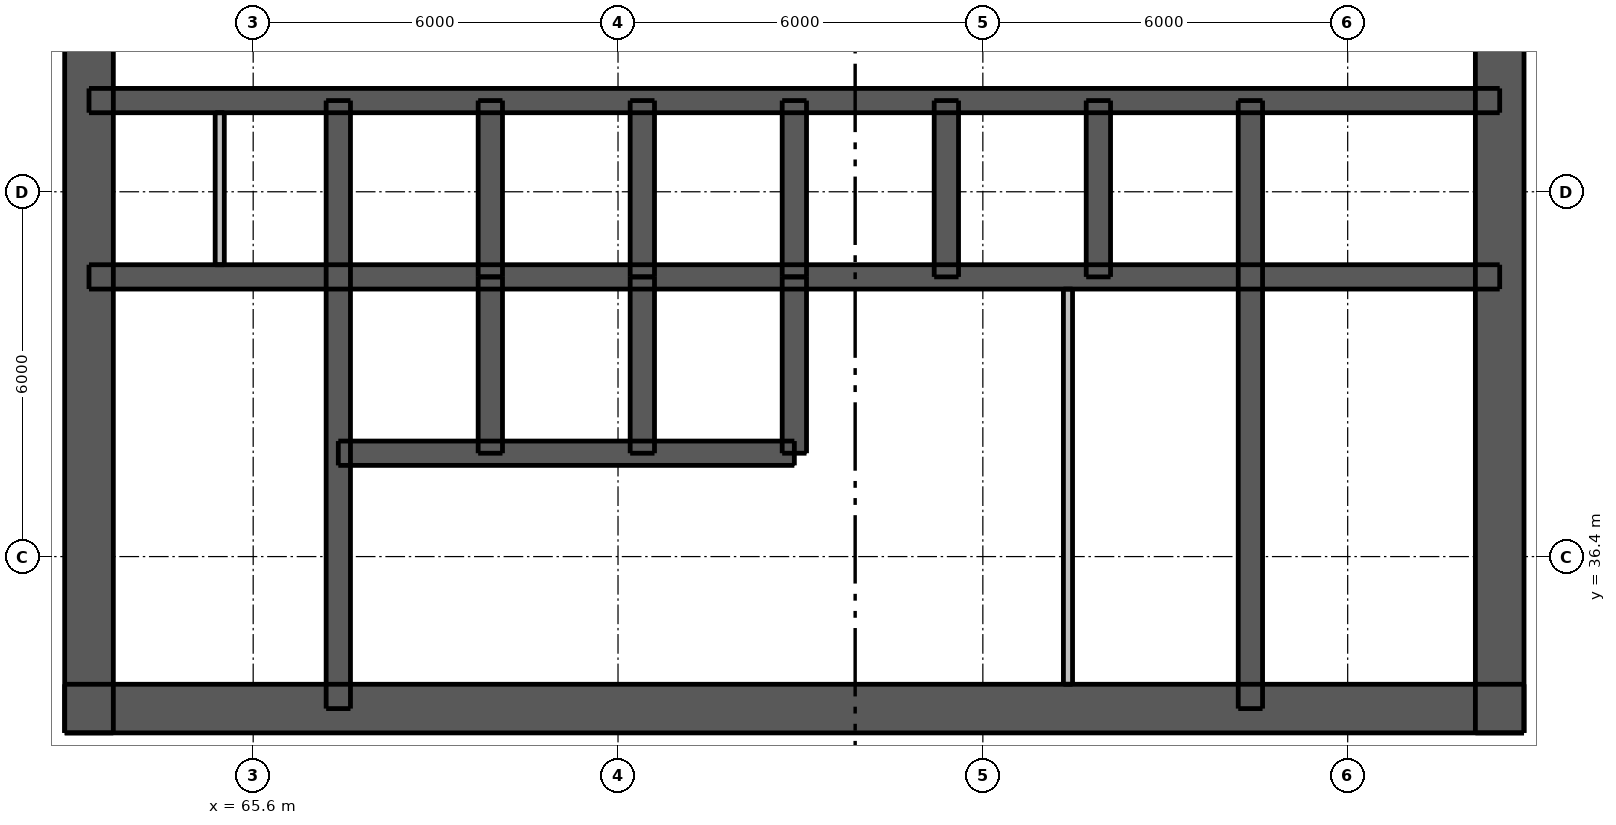
"""IFC4 building model, lengths in metres.
Left out: names, types, materials, properties, quantities, classifications, styles, units other than length and angle.
Written with IfcOpenShell. Run it as: python <this file> out.ifc"""

import sys

from ifc_helpers import new_model, si_unit, direction, frame, frame_2d, origin, place, context, subcontext, project, spatial, rectangle, extrude, element, fill, save


model = new_model("IFC4")
c1 = context("Model", 3, precision=1e-05, world=origin(), true_north=direction((0.0, 1.0)))
c2 = subcontext(c1, "Body", "Model", "MODEL_VIEW")
j1 = project(units=[si_unit("LENGTHUNIT", "METRE"), si_unit("PLANEANGLEUNIT", "RADIAN")], contexts=[c1])
p1 = place(None, origin())
s1 = spatial("IfcSite", under=j1, at=p1, CompositionType="ELEMENT")
p2 = place(p1, origin())
s2 = spatial("IfcBuilding", under=s1, at=p2, CompositionType="ELEMENT")
p3 = place(p2, frame((0.0, 0.0, 85.3)))
s3 = spatial("IfcBuildingStorey", under=s2, at=p3, CompositionType="ELEMENT", Elevation=85.3)
p4 = place(p3, frame((62.5, 33.9, 0.0), z_axis=(0.0, 0.0, 1.0), x_axis=(1.0, 0.0, 0.0)))
e1 = element("IfcWall", 1, at=p4, inside=s3, PredefinedType="SHEAR", context=c2, shape_type="SweptSolid", body=[
    extrude(rectangle(XDim=24.0, YDim=0.8, at=frame_2d((12.0, 0.0))), origin(), (0.0, 0.0, 1.0), 3.05),
])
p5 = place(p4, frame((2.0, 0.0, 0.0)))
e2 = element("IfcOpeningElement", 2, at=p5, cuts=e1, PredefinedType="OPENING", context=c2, shape_type="SweptSolid", body=[
    extrude(rectangle(XDim=1.1, YDim=2.1, at=frame_2d((0.55, 1.05))), frame((0.0, 0.41, 0.0), z_axis=(0.0, -1.0, 0.0), x_axis=(1.0, 0.0, 0.0)), (0.0, 0.0, 1.0), 0.82),
])
p6 = place(p4, frame((20.9, 0.0, 0.0)))
e3 = element("IfcOpeningElement", 3, at=p6, cuts=e1, PredefinedType="OPENING", context=c2, shape_type="SweptSolid", body=[
    extrude(rectangle(XDim=1.1, YDim=2.1, at=frame_2d((0.55, 1.05))), frame((0.0, 0.41, 0.0), z_axis=(0.0, -1.0, 0.0), x_axis=(1.0, 0.0, 0.0)), (0.0, 0.0, 1.0), 0.82),
])
p7 = place(p4, frame((8.0, 0.0, 0.0)))
e4 = element("IfcOpeningElement", 4, at=p7, cuts=e1, PredefinedType="OPENING", context=c2, shape_type="SweptSolid", body=[
    extrude(rectangle(XDim=1.1, YDim=2.1, at=frame_2d((0.55, 1.05))), frame((0.0, 0.41, 0.0), z_axis=(0.0, -1.0, 0.0), x_axis=(1.0, 0.0, 0.0)), (0.0, 0.0, 1.0), 0.82),
])
p8 = place(p4, frame((17.488, 0.0, 0.0)))
e5 = element("IfcOpeningElement", 5, at=p8, cuts=e1, PredefinedType="OPENING", context=c2, shape_type="SweptSolid", body=[
    extrude(rectangle(XDim=0.9, YDim=2.1, at=frame_2d((0.45, 1.05))), frame((0.0, 0.41, 0.0), z_axis=(0.0, -1.0, 0.0), x_axis=(1.0, 0.0, 0.0)), (0.0, 0.0, 1.0), 0.82),
])
p9 = place(p3, frame((62.9, 33.5, 0.0), z_axis=(0.0, 0.0, 1.0), x_axis=(0.0, 1.0, 0.0)))
e6 = element("IfcWall", 6, at=p9, inside=s3, PredefinedType="SHEAR", context=c2, shape_type="SweptSolid", body=[
    extrude(rectangle(XDim=24.0, YDim=0.8, at=frame_2d((12.0, 0.0))), origin(), (0.0, 0.0, 1.0), 3.05),
])
p10 = place(p9, frame((11.2, 0.0, 0.0)))
e7 = element("IfcOpeningElement", 7, at=p10, cuts=e6, PredefinedType="OPENING", context=c2, shape_type="SweptSolid", body=[
    extrude(rectangle(XDim=1.6, YDim=2.1, at=frame_2d((0.8, 1.05))), frame((0.0, 0.41, 0.0), z_axis=(0.0, -1.0, 0.0), x_axis=(1.0, 0.0, 0.0)), (0.0, 0.0, 1.0), 0.82),
])
p11 = place(p3, frame((86.1, 33.5, 0.0), z_axis=(0.0, 0.0, 1.0), x_axis=(0.0, 1.0, 0.0)))
e8 = element("IfcWall", 8, at=p11, inside=s3, PredefinedType="SHEAR", context=c2, shape_type="SweptSolid", body=[
    extrude(rectangle(XDim=24.0, YDim=0.8, at=frame_2d((12.0, 0.0))), origin(), (0.0, 0.0, 1.0), 3.05),
])
p12 = place(p11, frame((11.2, 0.0, 0.0)))
e9 = element("IfcOpeningElement", 9, at=p12, cuts=e8, PredefinedType="OPENING", context=c2, shape_type="SweptSolid", body=[
    extrude(rectangle(XDim=1.6, YDim=2.1, at=frame_2d((0.8, 1.05))), frame((0.0, 0.41, 0.0), z_axis=(0.0, -1.0, 0.0), x_axis=(1.0, 0.0, 0.0)), (0.0, 0.0, 1.0), 0.82),
])
p13 = place(p3, frame((62.9, 41.0, 0.0), z_axis=(0.0, 0.0, 1.0), x_axis=(1.0, 0.0, 0.0)))
e10 = element("IfcWall", 10, at=p13, inside=s3, PredefinedType="SHEAR", context=c2, shape_type="SweptSolid", body=[
    extrude(rectangle(XDim=23.2, YDim=0.4, at=frame_2d((11.6, 0.0))), origin(), (0.0, 0.0, 1.0), 3.05),
])
p14 = place(p3, frame((62.9, 43.9, 0.0), z_axis=(0.0, 0.0, 1.0), x_axis=(1.0, 0.0, 0.0)))
e11 = element("IfcWall", 11, at=p14, inside=s3, PredefinedType="SHEAR", context=c2, shape_type="SweptSolid", body=[
    extrude(rectangle(XDim=23.2, YDim=0.4, at=frame_2d((11.6, 0.0))), origin(), (0.0, 0.0, 1.0), 3.05),
])
p15 = place(p14, frame((0.825, 0.0, 0.0)))
e12 = element("IfcOpeningElement", 12, at=p15, cuts=e11, PredefinedType="OPENING", context=c2, shape_type="SweptSolid", body=[
    extrude(rectangle(XDim=0.9, YDim=2.1, at=frame_2d((0.45, 1.05))), frame((0.0, 0.21, 0.0), z_axis=(0.0, -1.0, 0.0), x_axis=(1.0, 0.0, 0.0)), (0.0, 0.0, 1.0), 0.42),
])
p16 = place(p14, frame((2.575, 0.0, 0.0)))
e13 = element("IfcOpeningElement", 13, at=p16, cuts=e11, PredefinedType="OPENING", context=c2, shape_type="SweptSolid", body=[
    extrude(rectangle(XDim=0.9, YDim=2.1, at=frame_2d((0.45, 1.05))), frame((0.0, 0.21, 0.0), z_axis=(0.0, -1.0, 0.0), x_axis=(1.0, 0.0, 0.0)), (0.0, 0.0, 1.0), 0.42),
])
p17 = place(p14, frame((20.6, 0.0, 0.0)))
e14 = element("IfcOpeningElement", 14, at=p17, cuts=e11, PredefinedType="OPENING", context=c2, shape_type="SweptSolid", body=[
    extrude(rectangle(XDim=0.9, YDim=2.1, at=frame_2d((0.45, 1.05))), frame((0.0, 0.21, 0.0), z_axis=(0.0, -1.0, 0.0), x_axis=(1.0, 0.0, 0.0)), (0.0, 0.0, 1.0), 0.42),
])
p18 = place(p14, frame((4.8, 0.0, 0.0)))
e15 = element("IfcOpeningElement", 15, at=p18, cuts=e11, PredefinedType="OPENING", context=c2, shape_type="SweptSolid", body=[
    extrude(rectangle(XDim=1.1, YDim=2.1, at=frame_2d((0.55, 1.05))), frame((0.0, 0.21, 0.0), z_axis=(0.0, -1.0, 0.0), x_axis=(1.0, 0.0, 0.0)), (0.0, 0.0, 1.0), 0.42),
])
p19 = place(p14, frame((7.3, 0.0, 0.0)))
e16 = element("IfcOpeningElement", 16, at=p19, cuts=e11, PredefinedType="OPENING", context=c2, shape_type="SweptSolid", body=[
    extrude(rectangle(XDim=1.1, YDim=2.1, at=frame_2d((0.55, 1.05))), frame((0.0, 0.21, 0.0), z_axis=(0.0, -1.0, 0.0), x_axis=(1.0, 0.0, 0.0)), (0.0, 0.0, 1.0), 0.42),
])
p20 = place(p14, frame((9.8, 0.0, 0.0)))
e17 = element("IfcOpeningElement", 17, at=p20, cuts=e11, PredefinedType="OPENING", context=c2, shape_type="SweptSolid", body=[
    extrude(rectangle(XDim=1.1, YDim=2.1, at=frame_2d((0.55, 1.05))), frame((0.0, 0.21, 0.0), z_axis=(0.0, -1.0, 0.0), x_axis=(1.0, 0.0, 0.0)), (0.0, 0.0, 1.0), 0.42),
])
p21 = place(p14, frame((12.3, 0.0, 0.0)))
e18 = element("IfcOpeningElement", 18, at=p21, cuts=e11, PredefinedType="OPENING", context=c2, shape_type="SweptSolid", body=[
    extrude(rectangle(XDim=1.1, YDim=2.1, at=frame_2d((0.55, 1.05))), frame((0.0, 0.21, 0.0), z_axis=(0.0, -1.0, 0.0), x_axis=(1.0, 0.0, 0.0)), (0.0, 0.0, 1.0), 0.42),
])
p22 = place(p14, frame((14.8, 0.0, 0.0)))
e19 = element("IfcOpeningElement", 19, at=p22, cuts=e11, PredefinedType="OPENING", context=c2, shape_type="SweptSolid", body=[
    extrude(rectangle(XDim=1.1, YDim=2.1, at=frame_2d((0.55, 1.05))), frame((0.0, 0.21, 0.0), z_axis=(0.0, -1.0, 0.0), x_axis=(1.0, 0.0, 0.0)), (0.0, 0.0, 1.0), 0.42),
])
p23 = place(p14, frame((17.3, 0.0, 0.0)))
e20 = element("IfcOpeningElement", 20, at=p23, cuts=e11, PredefinedType="OPENING", context=c2, shape_type="SweptSolid", body=[
    extrude(rectangle(XDim=1.1, YDim=2.1, at=frame_2d((0.55, 1.05))), frame((0.0, 0.21, 0.0), z_axis=(0.0, -1.0, 0.0), x_axis=(1.0, 0.0, 0.0)), (0.0, 0.0, 1.0), 0.42),
])
p24 = place(p3, frame((67.0, 33.9, 0.0), z_axis=(0.0, 0.0, 1.0), x_axis=(0.0, 1.0, 0.0)))
e21 = element("IfcWall", 21, at=p24, inside=s3, PredefinedType="SHEAR", context=c2, shape_type="SweptSolid", body=[
    extrude(rectangle(XDim=10.0, YDim=0.4, at=frame_2d((5.0, 0.0))), origin(), (0.0, 0.0, 1.0), 3.05),
])
p25 = place(p24, frame((0.6, 0.0, 0.0)))
e22 = element("IfcOpeningElement", 22, at=p25, cuts=e21, PredefinedType="OPENING", context=c2, shape_type="SweptSolid", body=[
    extrude(rectangle(XDim=1.1, YDim=2.1, at=frame_2d((0.55, 1.05))), frame((0.0, 0.21, 0.0), z_axis=(0.0, -1.0, 0.0), x_axis=(1.0, 0.0, 0.0)), (0.0, 0.0, 1.0), 0.42),
])
p26 = place(p3, frame((82.0, 33.9, 0.0), z_axis=(0.0, 0.0, 1.0), x_axis=(0.0, 1.0, 0.0)))
e23 = element("IfcWall", 23, at=p26, inside=s3, PredefinedType="SHEAR", context=c2, shape_type="SweptSolid", body=[
    extrude(rectangle(XDim=10.0, YDim=0.4, at=frame_2d((5.0, 0.0))), origin(), (0.0, 0.0, 1.0), 3.05),
])
for number, where, z_axis, x_axis in (
    (24, (69.5, 41.0, 0.0), (0.0, 0.0, 1.0), (0.0, 1.0, 0.0)),
    (25, (72.0, 41.0, 0.0), (0.0, 0.0, 1.0), (0.0, 1.0, 0.0)),
    (26, (74.5, 41.0, 0.0), (0.0, 0.0, 1.0), (0.0, 1.0, 0.0)),
    (27, (77.0, 41.0, 0.0), (0.0, 0.0, 1.0), (0.0, 1.0, 0.0)),
    (28, (79.5, 41.0, 0.0), (0.0, 0.0, 1.0), (0.0, 1.0, 0.0)),
):
    element("IfcWall", number, at=place(p3, frame(where, z_axis=z_axis, x_axis=x_axis)), inside=s3, PredefinedType="SHEAR", context=c2, shape_type="SweptSolid", body=[
        extrude(rectangle(XDim=2.9, YDim=0.4, at=frame_2d((1.45, 0.0))), origin(), (0.0, 0.0, 1.0), 3.05),
    ])
p27 = place(p3, frame((67.0, 38.1, 0.0), z_axis=(0.0, 0.0, 1.0), x_axis=(1.0, 0.0, 0.0)))
e29 = element("IfcWall", 29, at=p27, inside=s3, PredefinedType="SHEAR", context=c2, shape_type="SweptSolid", body=[
    extrude(rectangle(XDim=7.5, YDim=0.4, at=frame_2d((3.75, 0.0))), origin(), (0.0, 0.0, 1.0), 3.05),
])
p28 = place(p27, frame((0.7, 0.0, 0.0)))
e30 = element("IfcOpeningElement", 30, at=p28, cuts=e29, PredefinedType="OPENING", context=c2, shape_type="SweptSolid", body=[
    extrude(rectangle(XDim=1.1, YDim=2.1, at=frame_2d((0.55, 1.05))), frame((0.0, 0.21, 0.0), z_axis=(0.0, -1.0, 0.0), x_axis=(1.0, 0.0, 0.0)), (0.0, 0.0, 1.0), 0.42),
])
p29 = place(p27, frame((3.2, 0.0, 0.0)))
e31 = element("IfcOpeningElement", 31, at=p29, cuts=e29, PredefinedType="OPENING", context=c2, shape_type="SweptSolid", body=[
    extrude(rectangle(XDim=1.1, YDim=2.1, at=frame_2d((0.55, 1.05))), frame((0.0, 0.21, 0.0), z_axis=(0.0, -1.0, 0.0), x_axis=(1.0, 0.0, 0.0)), (0.0, 0.0, 1.0), 0.42),
])
p30 = place(p27, frame((5.65, 0.0, 0.0)))
e32 = element("IfcOpeningElement", 32, at=p30, cuts=e29, PredefinedType="OPENING", context=c2, shape_type="SweptSolid", body=[
    extrude(rectangle(XDim=1.2, YDim=2.1, at=frame_2d((0.6, 1.05))), frame((0.0, 0.21, 0.0), z_axis=(0.0, -1.0, 0.0), x_axis=(1.0, 0.0, 0.0)), (0.0, 0.0, 1.0), 0.42),
])
for number, where, z_axis, x_axis in (
    (33, (69.5, 38.1, 0.0), (0.0, 0.0, 1.0), (0.0, 1.0, 0.0)),
    (34, (72.0, 38.1, 0.0), (0.0, 0.0, 1.0), (0.0, 1.0, 0.0)),
    (35, (74.5, 38.1, 0.0), (0.0, 0.0, 1.0), (0.0, 1.0, 0.0)),
):
    element("IfcWall", number, at=place(p3, frame(where, z_axis=z_axis, x_axis=x_axis)), inside=s3, PredefinedType="SHEAR", context=c2, shape_type="SweptSolid", body=[
        extrude(rectangle(XDim=2.9, YDim=0.4, at=frame_2d((1.45, 0.0))), origin(), (0.0, 0.0, 1.0), 3.05),
    ])
p31 = place(p3, frame((79.0, 34.3, 0.0), z_axis=(0.0, 0.0, 1.0), x_axis=(0.0, 1.0, 0.0)))
e36 = element("IfcWall", 36, at=p31, inside=s3, PredefinedType="PLUMBINGWALL", context=c2, shape_type="SweptSolid", body=[
    extrude(rectangle(XDim=6.5, YDim=0.15, at=frame_2d((3.25, 0.0))), origin(), (0.0, 0.0, 1.0), 3.05),
])
p32 = place(p3, frame((65.05, 41.2, 0.0), z_axis=(0.0, 0.0, 1.0), x_axis=(0.0, 1.0, 0.0)))
e37 = element("IfcWall", 37, at=p32, inside=s3, PredefinedType="PLUMBINGWALL", context=c2, shape_type="SweptSolid", body=[
    extrude(rectangle(XDim=2.5, YDim=0.15, at=frame_2d((1.25, 0.0))), origin(), (0.0, 0.0, 1.0), 3.05),
])
p33 = place(p5, origin())
e38 = element("IfcDoor", 38, at=p33, inside=s3, OperationType="SINGLE_SWING_LEFT", PredefinedType="DOOR", context=c2, shape_type="SweptSolid", body=[
    extrude(rectangle(XDim=1.1, YDim=2.1, at=frame_2d((0.55, 1.05))), frame((0.0, 0.388, 0.0), z_axis=(0.0, -1.0, 0.0), x_axis=(1.0, 0.0, 0.0)), (0.0, 0.0, 1.0), 0.05),
])
fill(e2, e38)
p34 = place(p6, origin())
e39 = element("IfcDoor", 39, at=p34, inside=s3, OperationType="SINGLE_SWING_RIGHT", PredefinedType="DOOR", context=c2, shape_type="SweptSolid", body=[
    extrude(rectangle(XDim=1.1, YDim=2.1, at=frame_2d((0.55, 1.05))), frame((0.0, 0.388, 0.0), z_axis=(0.0, -1.0, 0.0), x_axis=(1.0, 0.0, 0.0)), (0.0, 0.0, 1.0), 0.05),
])
fill(e3, e39)
p35 = place(p7, origin())
e40 = element("IfcDoor", 40, at=p35, inside=s3, OperationType="SINGLE_SWING_LEFT", PredefinedType="DOOR", context=c2, shape_type="SweptSolid", body=[
    extrude(rectangle(XDim=1.1, YDim=2.1, at=frame_2d((0.55, 1.05))), frame((0.0, 0.388, 0.0), z_axis=(0.0, -1.0, 0.0), x_axis=(1.0, 0.0, 0.0)), (0.0, 0.0, 1.0), 0.05),
])
fill(e4, e40)
p36 = place(p25, origin())
e41 = element("IfcDoor", 41, at=p36, inside=s3, OperationType="SINGLE_SWING_RIGHT", PredefinedType="DOOR", context=c2, shape_type="SweptSolid", body=[
    extrude(rectangle(XDim=1.1, YDim=2.1, at=frame_2d((0.55, 1.05))), frame((0.0, -0.138, 0.0), z_axis=(0.0, -1.0, 0.0), x_axis=(1.0, 0.0, 0.0)), (0.0, 0.0, 1.0), 0.05),
])
fill(e22, e41)
p37 = place(p8, origin())
e42 = element("IfcDoor", 42, at=p37, inside=s3, OperationType="SINGLE_SWING_LEFT", PredefinedType="DOOR", context=c2, shape_type="SweptSolid", body=[
    extrude(rectangle(XDim=0.9, YDim=2.1, at=frame_2d((0.45, 1.05))), frame((0.0, 0.388, 0.0), z_axis=(0.0, -1.0, 0.0), x_axis=(1.0, 0.0, 0.0)), (0.0, 0.0, 1.0), 0.05),
])
fill(e5, e42)
p38 = place(p15, origin())
e43 = element("IfcDoor", 43, at=p38, inside=s3, OperationType="SINGLE_SWING_LEFT", PredefinedType="DOOR", context=c2, shape_type="SweptSolid", body=[
    extrude(rectangle(XDim=0.9, YDim=2.1, at=frame_2d((0.45, 1.05))), frame((0.0, -0.138, 0.0), z_axis=(0.0, -1.0, 0.0), x_axis=(1.0, 0.0, 0.0)), (0.0, 0.0, 1.0), 0.05),
])
fill(e12, e43)
p39 = place(p16, origin())
e44 = element("IfcDoor", 44, at=p39, inside=s3, OperationType="SINGLE_SWING_RIGHT", PredefinedType="DOOR", context=c2, shape_type="SweptSolid", body=[
    extrude(rectangle(XDim=0.9, YDim=2.1, at=frame_2d((0.45, 1.05))), frame((0.0, -0.138, 0.0), z_axis=(0.0, -1.0, 0.0), x_axis=(1.0, 0.0, 0.0)), (0.0, 0.0, 1.0), 0.05),
])
fill(e13, e44)
p40 = place(p17, origin())
e45 = element("IfcDoor", 45, at=p40, inside=s3, OperationType="SINGLE_SWING_LEFT", PredefinedType="DOOR", context=c2, shape_type="SweptSolid", body=[
    extrude(rectangle(XDim=0.9, YDim=2.1, at=frame_2d((0.45, 1.05))), frame((0.0, -0.138, 0.0), z_axis=(0.0, -1.0, 0.0), x_axis=(1.0, 0.0, 0.0)), (0.0, 0.0, 1.0), 0.05),
])
fill(e14, e45)
p41 = place(p18, origin())
e46 = element("IfcDoor", 46, at=p41, inside=s3, OperationType="DOUBLE_DOOR_SLIDING", PredefinedType="DOOR", context=c2, shape_type="SweptSolid", body=[
    extrude(rectangle(XDim=1.1, YDim=2.1, at=frame_2d((0.55, 1.05))), frame((0.0, 0.025, 0.0), z_axis=(0.0, -1.0, 0.0), x_axis=(1.0, 0.0, 0.0)), (0.0, 0.0, 1.0), 0.05),
])
fill(e15, e46)
p42 = place(p19, origin())
e47 = element("IfcDoor", 47, at=p42, inside=s3, OperationType="DOUBLE_DOOR_SLIDING", PredefinedType="DOOR", context=c2, shape_type="SweptSolid", body=[
    extrude(rectangle(XDim=1.1, YDim=2.1, at=frame_2d((0.55, 1.05))), frame((0.0, 0.025, 0.0), z_axis=(0.0, -1.0, 0.0), x_axis=(1.0, 0.0, 0.0)), (0.0, 0.0, 1.0), 0.05),
])
fill(e16, e47)
p43 = place(p20, origin())
e48 = element("IfcDoor", 48, at=p43, inside=s3, OperationType="DOUBLE_DOOR_SLIDING", PredefinedType="DOOR", context=c2, shape_type="SweptSolid", body=[
    extrude(rectangle(XDim=1.1, YDim=2.1, at=frame_2d((0.55, 1.05))), frame((0.0, 0.025, 0.0), z_axis=(0.0, -1.0, 0.0), x_axis=(1.0, 0.0, 0.0)), (0.0, 0.0, 1.0), 0.05),
])
fill(e17, e48)
p44 = place(p21, origin())
e49 = element("IfcDoor", 49, at=p44, inside=s3, OperationType="DOUBLE_DOOR_SLIDING", PredefinedType="DOOR", context=c2, shape_type="SweptSolid", body=[
    extrude(rectangle(XDim=1.1, YDim=2.1, at=frame_2d((0.55, 1.05))), frame((0.0, 0.025, 0.0), z_axis=(0.0, -1.0, 0.0), x_axis=(1.0, 0.0, 0.0)), (0.0, 0.0, 1.0), 0.05),
])
fill(e18, e49)
p45 = place(p22, origin())
e50 = element("IfcDoor", 50, at=p45, inside=s3, OperationType="DOUBLE_DOOR_SLIDING", PredefinedType="DOOR", context=c2, shape_type="SweptSolid", body=[
    extrude(rectangle(XDim=1.1, YDim=2.1, at=frame_2d((0.55, 1.05))), frame((0.0, 0.025, 0.0), z_axis=(0.0, -1.0, 0.0), x_axis=(1.0, 0.0, 0.0)), (0.0, 0.0, 1.0), 0.05),
])
fill(e19, e50)
p46 = place(p23, origin())
e51 = element("IfcDoor", 51, at=p46, inside=s3, OperationType="DOUBLE_DOOR_SLIDING", PredefinedType="DOOR", context=c2, shape_type="SweptSolid", body=[
    extrude(rectangle(XDim=1.1, YDim=2.1, at=frame_2d((0.55, 1.05))), frame((0.0, 0.025, 0.0), z_axis=(0.0, -1.0, 0.0), x_axis=(1.0, 0.0, 0.0)), (0.0, 0.0, 1.0), 0.05),
])
fill(e20, e51)
p47 = place(p28, origin())
e52 = element("IfcDoor", 52, at=p47, inside=s3, OperationType="DOUBLE_DOOR_SLIDING", PredefinedType="DOOR", context=c2, shape_type="SweptSolid", body=[
    extrude(rectangle(XDim=1.1, YDim=2.1, at=frame_2d((0.55, 1.05))), frame((0.0, 0.025, 0.0), z_axis=(0.0, -1.0, 0.0), x_axis=(1.0, 0.0, 0.0)), (0.0, 0.0, 1.0), 0.05),
])
fill(e30, e52)
p48 = place(p29, origin())
e53 = element("IfcDoor", 53, at=p48, inside=s3, OperationType="DOUBLE_DOOR_SLIDING", PredefinedType="DOOR", context=c2, shape_type="SweptSolid", body=[
    extrude(rectangle(XDim=1.1, YDim=2.1, at=frame_2d((0.55, 1.05))), frame((0.0, 0.025, 0.0), z_axis=(0.0, -1.0, 0.0), x_axis=(1.0, 0.0, 0.0)), (0.0, 0.0, 1.0), 0.05),
])
fill(e31, e53)
p49 = place(p30, origin())
e54 = element("IfcDoor", 54, at=p49, inside=s3, OperationType="DOUBLE_DOOR_SLIDING", PredefinedType="DOOR", context=c2, shape_type="SweptSolid", body=[
    extrude(rectangle(XDim=1.2, YDim=2.1, at=frame_2d((0.6, 1.05))), frame((0.0, 0.025, 0.0), z_axis=(0.0, -1.0, 0.0), x_axis=(1.0, 0.0, 0.0)), (0.0, 0.0, 1.0), 0.05),
])
fill(e32, e54)
save(model, sys.argv[1])
